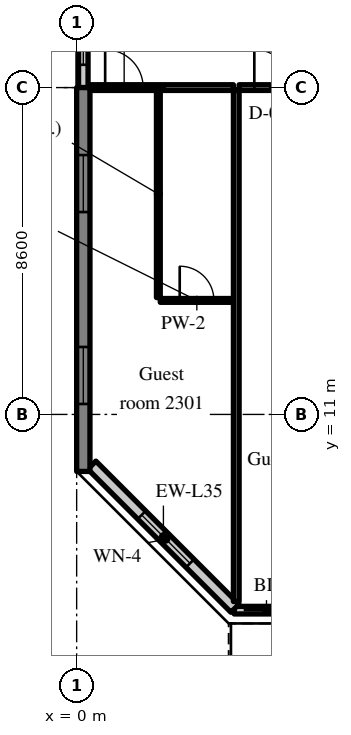
"""IFC4 building model, lengths in metres.
Left out: names, types, materials, properties, quantities, classifications, styles, units other than length and angle.
Written with IfcOpenShell. Run it as: python <this file> out.ifc"""

import sys

from ifc_helpers import new_model, si_unit, direction, frame, frame_2d, origin, place, context, subcontext, project, spatial, rectangle, extrude, source, transform, mapped, element, fill, save


model = new_model("IFC4")
c1 = context("Model", 3, precision=1e-05, world=origin(), true_north=direction((0.0, 1.0)))
c2 = subcontext(c1, "Body", "Model", "MODEL_VIEW")
j1 = project(units=[si_unit("LENGTHUNIT", "METRE"), si_unit("PLANEANGLEUNIT", "RADIAN")], contexts=[c1])
p1 = place(None, origin())
s1 = spatial("IfcSite", under=j1, at=p1, CompositionType="ELEMENT")
p2 = place(p1, origin())
s2 = spatial("IfcBuilding", under=s1, at=p2, CompositionType="ELEMENT")
p3 = place(p2, frame((0.0, 0.0, 99.0)))
s3 = spatial("IfcBuildingStorey", under=s2, at=p3, CompositionType="ELEMENT", Elevation=99.0)
m1 = source(origin(), c2, "Body", "SweptSolid", [
    extrude(rectangle(XDim=10.1, YDim=0.35, at=frame_2d((5.05, 0.0))), origin(), (0.0, 0.0, 1.0), 3.52),
])
p4 = place(p3, frame((0.175, 9.5, 0.0), z_axis=(0.0, 0.0, 1.0), x_axis=(0.0, 1.0, 0.0)))
e1 = element("IfcWall", 1, at=p4, inside=s3, PredefinedType="SHEAR", context=c2, shape_type="MappedRepresentation", body=[
    mapped(m1, transform((0.0, 0.0, 0.0), scale=1.0)),
])
m2 = source(origin(), c2, "Body", "SweptSolid", [
    extrude(rectangle(XDim=1.5, YDim=1.5, at=frame_2d((0.75, 0.75))), frame((0.0, 0.185, 0.0), z_axis=(0.0, -1.0, 0.0), x_axis=(1.0, 0.0, 0.0)), (0.0, 0.0, 1.0), 0.37),
])
p5 = place(p4, frame((1.775, 0.0, 0.9)))
e2 = element("IfcOpeningElement", 2, at=p5, cuts=e1, PredefinedType="OPENING", context=c2, shape_type="MappedRepresentation", body=[
    mapped(m2, transform((0.0, 0.0, 0.0), scale=1.0)),
])
p6 = place(p4, frame((6.825, 0.0, 0.9)))
e3 = element("IfcOpeningElement", 3, at=p6, cuts=e1, PredefinedType="OPENING", context=c2, shape_type="MappedRepresentation", body=[
    mapped(m2, transform((0.0, 0.0, 0.0), scale=1.0)),
])
m3 = source(origin(), c2, "Body", "SweptSolid", [
    extrude(rectangle(XDim=4.08, YDim=0.2, at=frame_2d((2.04, 0.0))), origin(), (0.0, 0.0, 1.0), 2.82),
])
p7 = place(p3, frame((4.145, 5.85, 0.0), z_axis=(0.0, 0.0, 1.0), x_axis=(1.0, 0.0, 0.0)))
e4 = element("IfcWall", 4, at=p7, inside=s3, PredefinedType="SOLIDWALL", context=c2, shape_type="MappedRepresentation", body=[
    mapped(m3, transform((0.0, 0.0, 0.0), scale=1.0)),
])
m4 = source(origin(), c2, "Body", "SweptSolid", [
    extrude(rectangle(XDim=1.2, YDim=2.4, at=frame_2d((0.6, 1.2))), frame((0.0, 0.11, 0.0), z_axis=(0.0, -1.0, 0.0), x_axis=(1.0, 0.0, 0.0)), (0.0, 0.0, 1.0), 0.22),
])
p8 = place(p7, frame((0.25, 0.0, 0.0)))
e5 = element("IfcOpeningElement", 5, at=p8, cuts=e4, PredefinedType="OPENING", context=c2, shape_type="MappedRepresentation", body=[
    mapped(m4, transform((0.0, 0.0, 0.0), scale=1.0)),
])
m5 = source(origin(), c2, "Body", "SweptSolid", [
    extrude(rectangle(XDim=1.5, YDim=1.5, at=frame_2d((0.75, 0.75))), frame((0.0, 0.11, 0.0), z_axis=(0.0, -1.0, 0.0), x_axis=(1.0, 0.0, 0.0)), (0.0, 0.0, 1.0), 0.22),
])
p9 = place(p7, frame((2.33, 0.0, 0.9)))
e6 = element("IfcOpeningElement", 6, at=p9, cuts=e4, PredefinedType="OPENING", context=c2, shape_type="MappedRepresentation", body=[
    mapped(m5, transform((0.0, 0.0, 0.0), scale=1.0)),
])
m6 = source(origin(), c2, "Body", "SweptSolid", [
    extrude(rectangle(XDim=5.326, YDim=0.3, at=frame_2d((2.663, 0.0))), origin(), (0.0, 0.0, 1.0), 3.52),
])
p10 = place(p3, frame((0.4, 9.666, 0.0), z_axis=(0.0, 0.0, 1.0), x_axis=(0.707106781187, -0.707106781187, 0.0)))
e7 = element("IfcWall", 7, at=p10, inside=s3, PredefinedType="SOLIDWALL", context=c2, shape_type="MappedRepresentation", body=[
    mapped(m6, transform((0.0, 0.0, 0.0), scale=1.0)),
])
m7 = source(origin(), c2, "Body", "SweptSolid", [
    extrude(rectangle(XDim=1.8, YDim=1.5, at=frame_2d((0.9, 0.75))), frame((0.0, 0.16, 0.0), z_axis=(0.0, -1.0, 0.0), x_axis=(1.0, 0.0, 0.0)), (0.0, 0.0, 1.0), 0.32),
])
p11 = place(p10, frame((1.854, 0.0, 0.9)))
e8 = element("IfcOpeningElement", 8, at=p11, cuts=e7, PredefinedType="OPENING", context=c2, shape_type="MappedRepresentation", body=[
    mapped(m7, transform((0.0, 0.0, 0.0), scale=1.0)),
])
m8 = source(origin(), c2, "Body", "SweptSolid", [
    extrude(rectangle(XDim=2.4, YDim=0.25, at=frame_2d((1.2, 0.0))), origin(), (0.0, 0.0, 1.0), 2.62),
])
p12 = place(p3, frame((0.175, 19.6, 0.0), z_axis=(0.0, 0.0, 1.0), x_axis=(0.0, 1.0, 0.0)))
e9 = element("IfcWall", 9, at=p12, inside=s3, PredefinedType="SOLIDWALL", context=c2, shape_type="MappedRepresentation", body=[
    mapped(m8, transform((0.0, 0.0, 0.0), scale=1.0)),
])
m9 = source(origin(), c2, "Body", "SweptSolid", [
    extrude(rectangle(XDim=1.2, YDim=1.5, at=frame_2d((0.6, 0.75))), frame((0.0, 0.135, 0.0), z_axis=(0.0, -1.0, 0.0), x_axis=(1.0, 0.0, 0.0)), (0.0, 0.0, 1.0), 0.27),
])
p13 = place(p12, frame((0.6, 0.0, 0.9)))
e10 = element("IfcOpeningElement", 10, at=p13, cuts=e9, PredefinedType="OPENING", context=c2, shape_type="MappedRepresentation", body=[
    mapped(m9, transform((0.0, 0.0, 0.0), scale=1.0)),
])
m10 = source(origin(), c2, "Body", "SweptSolid", [
    extrude(rectangle(XDim=5.45, YDim=0.1, at=frame_2d((2.725, 0.0))), origin(), (0.0, 0.0, 1.0), 3.52),
])
p14 = place(p3, frame((2.15, 14.075, 0.0), z_axis=(0.0, 0.0, 1.0), x_axis=(0.0, 1.0, 0.0)))
e11 = element("IfcWall", 11, at=p14, inside=s3, PredefinedType="PARTITIONING", context=c2, shape_type="MappedRepresentation", body=[
    mapped(m10, transform((0.0, 0.0, 0.0), scale=1.0)),
])
m11 = source(origin(), c2, "Body", "SweptSolid", [
    extrude(rectangle(XDim=1.925, YDim=0.1, at=frame_2d((0.962, 0.0))), origin(), (0.0, 0.0, 1.0), 3.52),
])
p15 = place(p3, frame((2.2, 14.0, 0.0), z_axis=(0.0, 0.0, 1.0), x_axis=(1.0, 0.0, 0.0)))
e12 = element("IfcWall", 12, at=p15, inside=s3, PredefinedType="PARTITIONING", context=c2, shape_type="MappedRepresentation", body=[
    mapped(m11, transform((0.0, 0.0, 0.0), scale=1.0)),
])
m12 = source(origin(), c2, "Body", "SweptSolid", [
    extrude(rectangle(XDim=0.9, YDim=2.1, at=frame_2d((0.45, 1.05))), frame((0.0, 0.06, 0.0), z_axis=(0.0, -1.0, 0.0), x_axis=(1.0, 0.0, 0.0)), (0.0, 0.0, 1.0), 0.12),
])
p16 = place(p15, frame((0.512, 0.0, 0.0)))
e13 = element("IfcOpeningElement", 13, at=p16, cuts=e12, PredefinedType="OPENING", context=c2, shape_type="MappedRepresentation", body=[
    mapped(m12, transform((0.0, 0.0, 0.0), scale=1.0)),
])
m13 = source(origin(), c2, "Body", "SweptSolid", [
    extrude(rectangle(XDim=3.775, YDim=0.15, at=frame_2d((1.887, 0.0))), origin(), (0.0, 0.0, 1.0), 2.82),
])
p17 = place(p3, frame((0.35, 19.6, 0.0), z_axis=(0.0, 0.0, 1.0), x_axis=(1.0, 0.0, 0.0)))
e14 = element("IfcWall", 14, at=p17, inside=s3, PredefinedType="PARTITIONING", context=c2, shape_type="MappedRepresentation", body=[
    mapped(m13, transform((0.0, 0.0, 0.0), scale=1.0)),
])
m14 = source(origin(), c2, "Body", "SweptSolid", [
    extrude(rectangle(XDim=1.0, YDim=2.1, at=frame_2d((0.5, 1.05))), frame((0.0, 0.085, 0.0), z_axis=(0.0, -1.0, 0.0), x_axis=(1.0, 0.0, 0.0)), (0.0, 0.0, 1.0), 0.17),
])
p18 = place(p17, frame((0.4, 0.0, 0.0)))
e15 = element("IfcOpeningElement", 15, at=p18, cuts=e14, PredefinedType="OPENING", context=c2, shape_type="MappedRepresentation", body=[
    mapped(m14, transform((0.0, 0.0, 0.0), scale=1.0)),
])
m15 = source(origin(), c2, "Body", "SweptSolid", [
    extrude(rectangle(XDim=3.95, YDim=0.15, at=frame_2d((1.975, 0.0))), origin(), (0.0, 0.0, 1.0), 2.82),
])
p19 = place(p3, frame((4.275, 19.6, 0.0), z_axis=(0.0, 0.0, 1.0), x_axis=(1.0, 0.0, 0.0)))
e16 = element("IfcWall", 16, at=p19, inside=s3, PredefinedType="PARTITIONING", context=c2, shape_type="MappedRepresentation", body=[
    mapped(m15, transform((0.0, 0.0, 0.0), scale=1.0)),
])
p20 = place(p19, frame((0.4, 0.0, 0.0)))
e17 = element("IfcOpeningElement", 17, at=p20, cuts=e16, PredefinedType="OPENING", context=c2, shape_type="MappedRepresentation", body=[
    mapped(m14, transform((0.0, 0.0, 0.0), scale=1.0)),
])
m16 = source(origin(), c2, "Body", "SweptSolid", [
    extrude(rectangle(XDim=13.447, YDim=0.15, at=frame_2d((6.724, 0.0))), origin(), (0.0, 0.0, 1.0), 3.52),
])
p21 = place(p3, frame((4.2, 6.078, 0.0), z_axis=(0.0, 0.0, 1.0), x_axis=(0.0, 1.0, 0.0)))
e18 = element("IfcWall", 18, at=p21, inside=s3, PredefinedType="PARTITIONING", context=c2, shape_type="MappedRepresentation", body=[
    mapped(m16, transform((0.0, 0.0, 0.0), scale=1.0)),
])
m17 = source(origin(), c2, "Body", "SweptSolid", [
    extrude(rectangle(XDim=1.2, YDim=2.4, at=frame_2d((0.6, 1.2))), frame((0.0, 0.025, 0.0), z_axis=(0.0, -1.0, 0.0), x_axis=(1.0, 0.0, 0.0)), (0.0, 0.0, 1.0), 0.05),
])
p22 = place(p8, origin())
e19 = element("IfcDoor", 19, at=p22, inside=s3, OperationType="SLIDING_TO_LEFT", PredefinedType="DOOR", context=c2, shape_type="MappedRepresentation", body=[
    mapped(m17, transform((0.0, 0.0, 0.0), scale=1.0)),
])
fill(e5, e19)
m18 = source(origin(), c2, "Body", "SweptSolid", [
    extrude(rectangle(XDim=1.8, YDim=1.5, at=frame_2d((0.9, 0.75))), frame((0.0, 0.03, 0.0), z_axis=(0.0, -1.0, 0.0), x_axis=(1.0, 0.0, 0.0)), (0.0, 0.0, 1.0), 0.06),
])
p23 = place(p11, origin())
e20 = element("IfcWindow", 20, at=p23, inside=s3, PartitioningType="SINGLE_PANEL", PredefinedType="WINDOW", context=c2, shape_type="MappedRepresentation", body=[
    mapped(m18, transform((0.0, 0.0, 0.0), scale=1.0)),
])
fill(e8, e20)
m19 = source(origin(), c2, "Body", "SweptSolid", [
    extrude(rectangle(XDim=1.5, YDim=1.5, at=frame_2d((0.75, 0.75))), frame((0.0, 0.03, 0.0), z_axis=(0.0, -1.0, 0.0), x_axis=(1.0, 0.0, 0.0)), (0.0, 0.0, 1.0), 0.06),
])
p24 = place(p5, origin())
e21 = element("IfcWindow", 21, at=p24, inside=s3, PartitioningType="SINGLE_PANEL", PredefinedType="WINDOW", context=c2, shape_type="MappedRepresentation", body=[
    mapped(m19, transform((0.0, 0.0, 0.0), scale=1.0)),
])
fill(e2, e21)
p25 = place(p6, origin())
e22 = element("IfcWindow", 22, at=p25, inside=s3, PartitioningType="SINGLE_PANEL", PredefinedType="WINDOW", context=c2, shape_type="MappedRepresentation", body=[
    mapped(m19, transform((0.0, 0.0, 0.0), scale=1.0)),
])
fill(e3, e22)
m20 = source(origin(), c2, "Body", "SweptSolid", [
    extrude(rectangle(XDim=1.2, YDim=1.5, at=frame_2d((0.6, 0.75))), frame((0.0, 0.03, 0.0), z_axis=(0.0, -1.0, 0.0), x_axis=(1.0, 0.0, 0.0)), (0.0, 0.0, 1.0), 0.06),
])
p26 = place(p13, origin())
e23 = element("IfcWindow", 23, at=p26, inside=s3, PartitioningType="SINGLE_PANEL", PredefinedType="WINDOW", context=c2, shape_type="MappedRepresentation", body=[
    mapped(m20, transform((0.0, 0.0, 0.0), scale=1.0)),
])
fill(e10, e23)
m21 = source(origin(), c2, "Body", "SweptSolid", [
    extrude(rectangle(XDim=0.9, YDim=2.1, at=frame_2d((0.45, 1.05))), frame((0.0, 0.025, 0.0), z_axis=(0.0, -1.0, 0.0), x_axis=(1.0, 0.0, 0.0)), (0.0, 0.0, 1.0), 0.05),
])
p27 = place(p16, origin())
e24 = element("IfcDoor", 24, at=p27, inside=s3, OperationType="SINGLE_SWING_LEFT", PredefinedType="DOOR", context=c2, shape_type="MappedRepresentation", body=[
    mapped(m21, transform((0.0, 0.0, 0.0), scale=1.0)),
])
fill(e13, e24)
m22 = source(origin(), c2, "Body", "SweptSolid", [
    extrude(rectangle(XDim=1.0, YDim=2.1, at=frame_2d((0.5, 1.05))), frame((0.0, 0.025, 0.0), z_axis=(0.0, -1.0, 0.0), x_axis=(1.0, 0.0, 0.0)), (0.0, 0.0, 1.0), 0.05),
])
p28 = place(p18, origin())
e25 = element("IfcDoor", 25, at=p28, inside=s3, OperationType="SINGLE_SWING_LEFT", PredefinedType="DOOR", context=c2, shape_type="MappedRepresentation", body=[
    mapped(m22, transform((0.0, 0.0, 0.0), scale=1.0)),
])
fill(e15, e25)
p29 = place(p20, origin())
e26 = element("IfcDoor", 26, at=p29, inside=s3, OperationType="SINGLE_SWING_LEFT", PredefinedType="DOOR", context=c2, shape_type="MappedRepresentation", body=[
    mapped(m22, transform((0.0, 0.0, 0.0), scale=1.0)),
])
fill(e17, e26)
save(model, sys.argv[1])
